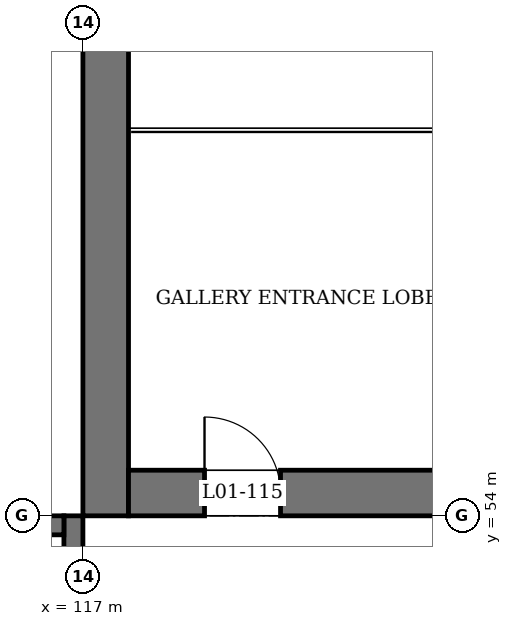
"""IFC4 building model, lengths in metres.
Left out: names, types, materials, properties, quantities, classifications, styles, units other than length and angle.
Written with IfcOpenShell. Run it as: python <this file> out.ifc"""

import sys

from ifc_helpers import new_model, si_unit, direction, frame, frame_2d, origin, place, context, subcontext, project, spatial, rectangle, extrude, element, fill, save


model = new_model("IFC4")
c1 = context("Model", 3, precision=1e-05, world=origin(), true_north=direction((0.0, 1.0)))
c2 = subcontext(c1, "Body", "Model", "MODEL_VIEW")
j1 = project(units=[si_unit("LENGTHUNIT", "METRE"), si_unit("PLANEANGLEUNIT", "RADIAN")], contexts=[c1])
p1 = place(None, origin())
s1 = spatial("IfcSite", under=j1, at=p1, CompositionType="ELEMENT")
p2 = place(p1, origin())
s2 = spatial("IfcBuilding", under=s1, at=p2, CompositionType="ELEMENT")
p3 = place(p2, frame((0.0, 0.0, 6.0)))
s3 = spatial("IfcBuildingStorey", under=s2, at=p3, CompositionType="ELEMENT", Elevation=6.0)
p4 = place(p3, frame((116.875, 45.0, 0.0), z_axis=(0.0, 0.0, 1.0), x_axis=(0.0, 1.0, 0.0)))
e1 = element("IfcWall", 1, at=p4, inside=s3, PredefinedType="SHEAR", context=c2, shape_type="SweptSolid", body=[
    extrude(rectangle(XDim=9.0, YDim=0.25, at=frame_2d((4.5, 0.0))), origin(), (0.0, 0.0, 1.0), 4.5),
])
p5 = place(p4, frame((1.75, 0.0, 0.0)))
e2 = element("IfcOpeningElement", 2, at=p5, cuts=e1, PredefinedType="OPENING", context=c2, shape_type="SweptSolid", body=[
    extrude(rectangle(XDim=1.0, YDim=2.1, at=frame_2d((0.5, 1.05))), frame((0.0, 0.135, 0.0), z_axis=(0.0, -1.0, 0.0), x_axis=(1.0, 0.0, 0.0)), (0.0, 0.0, 1.0), 0.27),
])
p6 = place(p3, frame((108.25, 53.875, 0.0), z_axis=(0.0, 0.0, 1.0), x_axis=(1.0, 0.0, 0.0)))
e3 = element("IfcWall", 3, at=p6, inside=s3, PredefinedType="SHEAR", context=c2, shape_type="SweptSolid", body=[
    extrude(rectangle(XDim=8.5, YDim=0.25, at=frame_2d((4.25, 0.0))), origin(), (0.0, 0.0, 1.0), 4.5),
])
p7 = place(p3, frame((117.3, 54.0, 0.0), z_axis=(0.0, 0.0, 1.0), x_axis=(0.0, 1.0, 0.0)))
e4 = element("IfcWall", 4, at=p7, inside=s3, PredefinedType="SHEAR", context=c2, shape_type="SweptSolid", body=[
    extrude(rectangle(XDim=26.4, YDim=0.6, at=frame_2d((13.2, 0.0))), origin(), (0.0, 0.0, 1.0), 4.5),
])
p8 = place(p3, frame((117.6, 54.3, 0.0), z_axis=(0.0, 0.0, 1.0), x_axis=(1.0, 0.0, 0.0)))
e5 = element("IfcWall", 5, at=p8, inside=s3, PredefinedType="SHEAR", context=c2, shape_type="SweptSolid", body=[
    extrude(rectangle(XDim=25.8, YDim=0.6, at=frame_2d((12.9, 0.0))), origin(), (0.0, 0.0, 1.0), 4.5),
])
p9 = place(p8, frame((1.0, 0.0, 0.0)))
e6 = element("IfcOpeningElement", 6, at=p9, cuts=e5, PredefinedType="OPENING", context=c2, shape_type="SweptSolid", body=[
    extrude(rectangle(XDim=1.0, YDim=2.1, at=frame_2d((0.5, 1.05))), frame((0.0, 0.31, 0.0), z_axis=(0.0, -1.0, 0.0), x_axis=(1.0, 0.0, 0.0)), (0.0, 0.0, 1.0), 0.62),
])
p10 = place(p9, origin())
e7 = element("IfcDoor", 7, at=p10, inside=s3, OperationType="SINGLE_SWING_LEFT", PredefinedType="DOOR", context=c2, shape_type="SweptSolid", body=[
    extrude(rectangle(XDim=1.0, YDim=2.1, at=frame_2d((0.5, 1.05))), frame((0.0, 0.025, 0.0), z_axis=(0.0, -1.0, 0.0), x_axis=(1.0, 0.0, 0.0)), (0.0, 0.0, 1.0), 0.05),
])
fill(e6, e7)
save(model, sys.argv[1])
